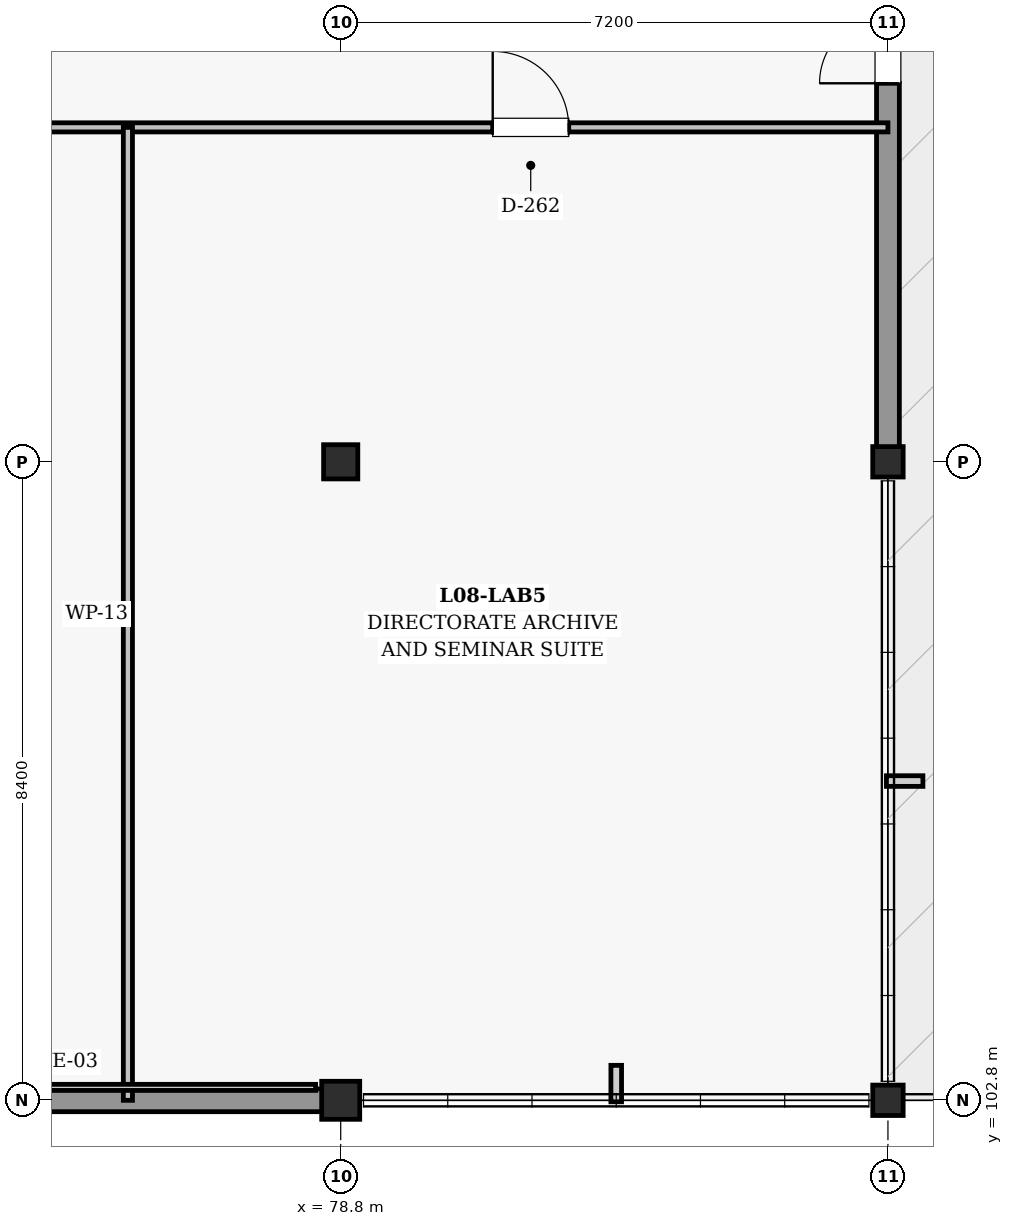
"""IFC4 building model, lengths in metres.
Left out: names, types, materials, properties, quantities, classifications, styles, units other than length and angle.
Written with IfcOpenShell. Run it as: python <this file> out.ifc"""

import sys

from ifc_helpers import new_model, si_unit, direction, frame, frame_2d, origin, origin_2d, place, context, subcontext, project, spatial, rectangle, extrude, element, fill, save


model = new_model("IFC4")
c1 = context("Model", 3, precision=1e-05, world=origin(), true_north=direction((0.0, 1.0)))
c2 = subcontext(c1, "Body", "Model", "MODEL_VIEW")
j1 = project(units=[si_unit("LENGTHUNIT", "METRE"), si_unit("PLANEANGLEUNIT", "RADIAN")], contexts=[c1])
p1 = place(None, origin())
s1 = spatial("IfcSite", under=j1, at=p1, CompositionType="ELEMENT")
p2 = place(p1, origin())
s2 = spatial("IfcBuilding", under=s1, at=p2, CompositionType="ELEMENT")
p3 = place(p2, frame((0.0, 0.0, 36.9)))
s3 = spatial("IfcBuildingStorey", under=s2, at=p3, CompositionType="ELEMENT", Elevation=36.9)
p4 = place(p3, frame((78.8, 102.8, 0.0), z_axis=(0.0, 0.0, 1.0), x_axis=(1.0, 0.0, 0.0)))
e1 = element("IfcColumn", 1, at=p4, inside=s3, PredefinedType="COLUMN", context=c2, shape_type="SweptSolid", body=[
    extrude(rectangle(XDim=0.5, YDim=0.5, at=origin_2d()), origin(), (0.0, 0.0, 1.0), 4.5),
])
p5 = place(p3, frame((78.8, 111.2, 0.0), z_axis=(0.0, 0.0, 1.0), x_axis=(1.0, 0.0, 0.0)))
e2 = element("IfcColumn", 2, at=p5, inside=s3, PredefinedType="COLUMN", context=c2, shape_type="SweptSolid", body=[
    extrude(rectangle(XDim=0.45, YDim=0.45, at=origin_2d()), origin(), (0.0, 0.0, 1.0), 4.5),
])
for number, where, z_axis, x_axis in (
    (3, (86.0, 102.8, 0.0), (0.0, 0.0, 1.0), (1.0, 0.0, 0.0)),
    (4, (86.0, 111.2, 0.0), (0.0, 0.0, 1.0), (1.0, 0.0, 0.0)),
):
    element("IfcColumn", number, at=place(p3, frame(where, z_axis=z_axis, x_axis=x_axis)), inside=s3, PredefinedType="COLUMN", context=c2, shape_type="SweptSolid", body=[
        extrude(rectangle(XDim=0.4, YDim=0.4, at=origin_2d()), origin(), (0.0, 0.0, 1.0), 4.5),
    ])
p6 = place(p3, frame((71.78, 102.8, 0.0), z_axis=(0.0, 0.0, 1.0), x_axis=(1.0, 0.0, 0.0)))
e5 = element("IfcWall", 5, at=p6, inside=s3, PredefinedType="SOLIDWALL", context=c2, shape_type="SweptSolid", body=[
    extrude(rectangle(XDim=6.79, YDim=0.3, at=frame_2d((3.395, 0.0))), origin(), (0.0, 0.0, 1.0), 2.955),
])
p7 = place(p3, frame((86.0, 111.38, 0.0), z_axis=(0.0, 0.0, 1.0), x_axis=(0.0, 1.0, 0.0)))
e6 = element("IfcWall", 6, at=p7, inside=s3, PredefinedType="SOLIDWALL", context=c2, shape_type="SweptSolid", body=[
    extrude(rectangle(XDim=8.015, YDim=0.3, at=frame_2d((4.008, 0.0))), origin(), (0.0, 0.0, 1.0), 2.955),
])
p8 = place(p7, frame((4.8, 0.0, 0.0)))
e7 = element("IfcOpeningElement", 7, at=p8, cuts=e6, PredefinedType="OPENING", context=c2, shape_type="SweptSolid", body=[
    extrude(rectangle(XDim=1.8, YDim=2.3, at=frame_2d((0.9, 1.15))), frame((0.0, 0.16, 0.0), z_axis=(0.0, -1.0, 0.0), x_axis=(1.0, 0.0, 0.0)), (0.0, 0.0, 1.0), 0.32),
])
p9 = place(p3, frame((14.0, 115.6, 0.0), z_axis=(0.0, 0.0, 1.0), x_axis=(1.0, 0.0, 0.0)))
e8 = element("IfcWall", 8, at=p9, inside=s3, PredefinedType="PARTITIONING", context=c2, shape_type="SweptSolid", body=[
    extrude(rectangle(XDim=72.0, YDim=0.12, at=frame_2d((36.0, 0.0))), origin(), (0.0, 0.0, 1.0), 2.96),
])
p10 = place(p9, frame((29.9, 0.0, 0.0)))
e9 = element("IfcOpeningElement", 9, at=p10, cuts=e8, PredefinedType="OPENING", context=c2, shape_type="SweptSolid", body=[
    extrude(rectangle(XDim=1.0, YDim=2.15, at=frame_2d((0.5, 1.075))), frame((0.0, 0.07, 0.0), z_axis=(0.0, -1.0, 0.0), x_axis=(1.0, 0.0, 0.0)), (0.0, 0.0, 1.0), 0.14),
])
p11 = place(p9, frame((8.3, 0.0, 0.0)))
e10 = element("IfcOpeningElement", 10, at=p11, cuts=e8, PredefinedType="OPENING", context=c2, shape_type="SweptSolid", body=[
    extrude(rectangle(XDim=1.6, YDim=2.25, at=frame_2d((0.8, 1.125))), frame((0.0, 0.07, 0.0), z_axis=(0.0, -1.0, 0.0), x_axis=(1.0, 0.0, 0.0)), (0.0, 0.0, 1.0), 0.14),
])
p12 = place(p9, frame((24.7, 0.0, 0.0)))
e11 = element("IfcOpeningElement", 11, at=p12, cuts=e8, PredefinedType="OPENING", context=c2, shape_type="SweptSolid", body=[
    extrude(rectangle(XDim=1.5, YDim=2.25, at=frame_2d((0.75, 1.125))), frame((0.0, 0.07, 0.0), z_axis=(0.0, -1.0, 0.0), x_axis=(1.0, 0.0, 0.0)), (0.0, 0.0, 1.0), 0.14),
])
p13 = place(p9, frame((44.1, 0.0, 0.0)))
e12 = element("IfcOpeningElement", 12, at=p13, cuts=e8, PredefinedType="OPENING", context=c2, shape_type="SweptSolid", body=[
    extrude(rectangle(XDim=1.5, YDim=2.25, at=frame_2d((0.75, 1.125))), frame((0.0, 0.07, 0.0), z_axis=(0.0, -1.0, 0.0), x_axis=(1.0, 0.0, 0.0)), (0.0, 0.0, 1.0), 0.14),
])
p14 = place(p9, frame((59.1, 0.0, 0.0)))
e13 = element("IfcOpeningElement", 13, at=p14, cuts=e8, PredefinedType="OPENING", context=c2, shape_type="SweptSolid", body=[
    extrude(rectangle(XDim=1.35, YDim=2.2, at=frame_2d((0.675, 1.1))), frame((0.0, 0.07, 0.0), z_axis=(0.0, -1.0, 0.0), x_axis=(1.0, 0.0, 0.0)), (0.0, 0.0, 1.0), 0.14),
])
p15 = place(p9, frame((66.8, 0.0, 0.0)))
e14 = element("IfcOpeningElement", 14, at=p15, cuts=e8, PredefinedType="OPENING", context=c2, shape_type="SweptSolid", body=[
    extrude(rectangle(XDim=1.0, YDim=2.15, at=frame_2d((0.5, 1.075))), frame((0.0, 0.07, 0.0), z_axis=(0.0, -1.0, 0.0), x_axis=(1.0, 0.0, 0.0)), (0.0, 0.0, 1.0), 0.14),
])
p16 = place(p3, frame((76.0, 102.8, 0.0), z_axis=(0.0, 0.0, 1.0), x_axis=(0.0, 1.0, 0.0)))
e15 = element("IfcWall", 15, at=p16, inside=s3, PredefinedType="PARTITIONING", context=c2, shape_type="SweptSolid", body=[
    extrude(rectangle(XDim=12.8, YDim=0.12, at=frame_2d((6.4, 0.0))), origin(), (0.0, 0.0, 1.0), 3.36),
])
p17 = place(p8, origin())
e16 = element("IfcDoor", 16, at=p17, inside=s3, OperationType="DOUBLE_DOOR_SINGLE_SWING", PredefinedType="DOOR", context=c2, shape_type="SweptSolid", body=[
    extrude(rectangle(XDim=1.8, YDim=2.3, at=frame_2d((0.9, 1.15))), frame((0.0, 0.025, 0.0), z_axis=(0.0, -1.0, 0.0), x_axis=(1.0, 0.0, 0.0)), (0.0, 0.0, 1.0), 0.05),
])
fill(e7, e16)
p18 = place(p15, origin())
e17 = element("IfcDoor", 17, at=p18, inside=s3, OperationType="SINGLE_SWING_LEFT", PredefinedType="DOOR", context=c2, shape_type="SweptSolid", body=[
    extrude(rectangle(XDim=1.0, YDim=2.15, at=frame_2d((0.5, 1.075))), frame((0.0, 0.025, 0.0), z_axis=(0.0, -1.0, 0.0), x_axis=(1.0, 0.0, 0.0)), (0.0, 0.0, 1.0), 0.05),
])
fill(e14, e17)
save(model, sys.argv[1])
